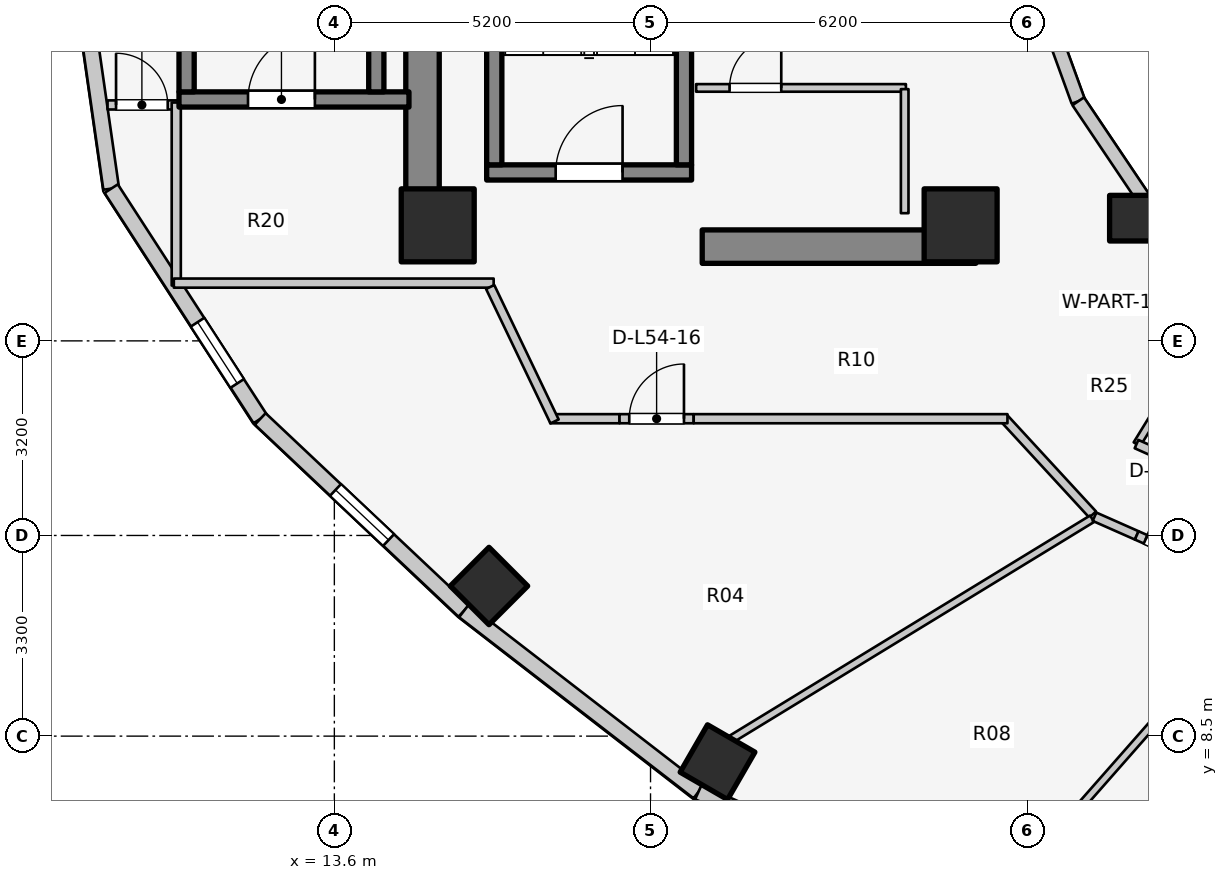
"""IFC4 building model, lengths in metres.
Left out: names, types, materials, properties, quantities, classifications, styles, units other than length and angle.
Written with IfcOpenShell. Run it as: python <this file> out.ifc"""

import sys

from ifc_helpers import new_model, si_unit, direction, frame, frame_2d, origin, origin_2d, place, context, subcontext, project, spatial, rectangle, extrude, element, fill, save


model = new_model("IFC4")
c1 = context("Model", 3, precision=1e-05, world=origin(), true_north=direction((0.0, 1.0)))
c2 = subcontext(c1, "Body", "Model", "MODEL_VIEW")
j1 = project(units=[si_unit("LENGTHUNIT", "METRE"), si_unit("PLANEANGLEUNIT", "RADIAN")], contexts=[c1])
p1 = place(None, origin())
s1 = spatial("IfcSite", under=j1, at=p1, CompositionType="ELEMENT")
p2 = place(p1, origin())
s2 = spatial("IfcBuilding", under=s1, at=p2, CompositionType="ELEMENT")
p3 = place(p2, frame((0.0, 0.0, 177.7)))
s3 = spatial("IfcBuildingStorey", under=s2, at=p3, CompositionType="ELEMENT", Elevation=177.7)
p4 = place(p3, frame((15.05, 17.05, 0.0), z_axis=(0.0, 0.0, 1.0), x_axis=(0.0, 1.0, 0.0)))
e1 = element("IfcWall", 1, at=p4, inside=s3, PredefinedType="SHEAR", context=c2, shape_type="SweptSolid", body=[
    extrude(rectangle(XDim=12.8, YDim=0.55, at=frame_2d((6.4, 0.0))), origin(), (0.0, 0.0, 1.0), 3.1),
])
p5 = place(p3, frame((19.65, 16.55, 0.0), z_axis=(0.0, 0.0, 1.0), x_axis=(1.0, 0.0, 0.0)))
e2 = element("IfcWall", 2, at=p5, inside=s3, PredefinedType="SHEAR", context=c2, shape_type="SweptSolid", body=[
    extrude(rectangle(XDim=4.5, YDim=0.55, at=frame_2d((2.25, 0.0))), origin(), (0.0, 0.0, 1.0), 3.1),
])
p6 = place(p3, frame((16.105, 17.77, 0.0), z_axis=(0.0, 0.0, 1.0), x_axis=(1.0, 0.0, 0.0)))
e3 = element("IfcWall", 3, at=p6, inside=s3, PredefinedType="SOLIDWALL", context=c2, shape_type="SweptSolid", body=[
    extrude(rectangle(XDim=3.37, YDim=0.25, at=frame_2d((1.685, 0.0))), origin(), (0.0, 0.0, 1.0), 3.1),
])
p7 = place(p6, frame((1.135, 0.0, 0.0)))
e4 = element("IfcOpeningElement", 4, at=p7, cuts=e3, PredefinedType="OPENING", context=c2, shape_type="SweptSolid", body=[
    extrude(rectangle(XDim=1.1, YDim=2.1, at=frame_2d((0.55, 1.05))), frame((0.0, 0.135, 0.0), z_axis=(0.0, -1.0, 0.0), x_axis=(1.0, 0.0, 0.0)), (0.0, 0.0, 1.0), 0.27),
])
for number, where, z_axis, x_axis in (
    (5, (16.23, 17.895, 0.0), (0.0, 0.0, 1.0), (0.0, 1.0, 0.0)),
    (6, (19.35, 17.895, 0.0), (0.0, 0.0, 1.0), (0.0, 1.0, 0.0)),
):
    element("IfcWall", number, at=place(p3, frame(where, z_axis=z_axis, x_axis=x_axis)), inside=s3, PredefinedType="SOLIDWALL", context=c2, shape_type="SweptSolid", body=[
        extrude(rectangle(XDim=7.81, YDim=0.25, at=frame_2d((3.905, 0.0))), origin(), (0.0, 0.0, 1.0), 3.1),
    ])
p8 = place(p3, frame((11.045, 18.97, 0.0), z_axis=(0.0, 0.0, 1.0), x_axis=(1.0, 0.0, 0.0)))
e7 = element("IfcWall", 7, at=p8, inside=s3, PredefinedType="SOLIDWALL", context=c2, shape_type="SweptSolid", body=[
    extrude(rectangle(XDim=3.782, YDim=0.25, at=frame_2d((1.891, 0.0))), origin(), (0.0, 0.0, 1.0), 3.1),
])
p9 = place(p8, frame((1.135, 0.0, 0.0)))
e8 = element("IfcOpeningElement", 8, at=p9, cuts=e7, PredefinedType="OPENING", context=c2, shape_type="SweptSolid", body=[
    extrude(rectangle(XDim=1.1, YDim=2.1, at=frame_2d((0.55, 1.05))), frame((0.0, 0.135, 0.0), z_axis=(0.0, -1.0, 0.0), x_axis=(1.0, 0.0, 0.0)), (0.0, 0.0, 1.0), 0.27),
])
for number, where, z_axis, x_axis in (
    (9, (11.17, 19.095, 0.0), (0.0, 0.0, 1.0), (0.0, 1.0, 0.0)),
    (10, (14.29, 19.095, 0.0), (0.0, 0.0, 1.0), (0.0, 1.0, 0.0)),
):
    element("IfcWall", number, at=place(p3, frame(where, z_axis=z_axis, x_axis=x_axis)), inside=s3, PredefinedType="SOLIDWALL", context=c2, shape_type="SweptSolid", body=[
        extrude(rectangle(XDim=7.81, YDim=0.25, at=frame_2d((3.905, 0.0))), origin(), (0.0, 0.0, 1.0), 3.1),
    ])
for number, where, z_axis, x_axis in (
    (11, (15.3, 16.9, 0.0), (0.0, 0.0, 1.0), (1.0, 0.0, 0.0)),
    (12, (23.9, 16.9, 0.0), (0.0, 0.0, 1.0), (1.0, 0.0, 0.0)),
):
    element("IfcColumn", number, at=place(p3, frame(where, z_axis=z_axis, x_axis=x_axis)), inside=s3, PredefinedType="COLUMN", context=c2, shape_type="SweptSolid", body=[
        extrude(rectangle(XDim=1.2, YDim=1.2, at=origin_2d()), origin(), (0.0, 0.0, 1.0), 3.1),
    ])
p10 = place(p3, frame((26.725, 17.018, 0.0), z_axis=(0.0, 0.0, 1.0), x_axis=(1.0, 0.0, 0.0)))
e13 = element("IfcColumn", 13, at=p10, inside=s3, PredefinedType="COLUMN", context=c2, shape_type="SweptSolid", body=[
    extrude(rectangle(XDim=0.75, YDim=0.75, at=origin_2d()), origin(), (0.0, 0.0, 1.0), 3.1),
])
for number, where, z_axis, x_axis in (
    (14, (16.143, 10.969, 0.0), (0.0, 0.0, 1.0), (-0.707, -0.707, 0.0)),
    (15, (19.902, 8.072, 0.0), (0.0, 0.0, 1.0), (-0.5, -0.866, 0.0)),
):
    element("IfcColumn", number, at=place(p3, frame(where, z_axis=z_axis, x_axis=x_axis)), inside=s3, PredefinedType="COLUMN", context=c2, shape_type="SweptSolid", body=[
        extrude(rectangle(XDim=0.9, YDim=0.9, at=origin_2d()), origin(), (0.0, 0.0, 1.0), 3.1),
    ])
p11 = place(p3, frame((25.123, 20.898, 0.0), z_axis=(0.0, 0.0, 1.0), x_axis=(0.341423187295, -0.93990968033, 0.0)))
e16 = element("IfcWall", 16, at=p11, inside=s3, PredefinedType="STANDARD", context=c2, shape_type="SweptSolid", body=[
    extrude(rectangle(XDim=2.084, YDim=0.23, at=frame_2d((1.042, 0.0))), origin(), (0.0, 0.0, 1.0), 2.56),
])
p12 = place(p3, frame((25.834, 18.94, 0.0), z_axis=(0.0, 0.0, 1.0), x_axis=(0.558197800898, -0.829707909492, 0.0)))
e17 = element("IfcWall", 17, at=p12, inside=s3, PredefinedType="STANDARD", context=c2, shape_type="SweptSolid", body=[
    extrude(rectangle(XDim=2.027, YDim=0.23, at=frame_2d((1.013, 0.0))), origin(), (0.0, 0.0, 1.0), 1.22),
])
p13 = place(p3, frame((26.965, 17.258, 0.0), z_axis=(0.0, 0.0, 1.0), x_axis=(0.752576694707, -0.658504607869, 0.0)))
e18 = element("IfcWall", 18, at=p13, inside=s3, PredefinedType="STANDARD", context=c2, shape_type="SweptSolid", body=[
    extrude(rectangle(XDim=1.959, YDim=0.23, at=frame_2d((0.98, 0.0))), origin(), (0.0, 0.0, 1.0), 1.22),
])
p14 = place(p3, frame((9.14, 23.0, 0.0), z_axis=(0.0, 0.0, 1.0), x_axis=(0.142227632286, -0.989833976288, 0.0)))
e19 = element("IfcWall", 19, at=p14, inside=s3, PredefinedType="STANDARD", context=c2, shape_type="SweptSolid", body=[
    extrude(rectangle(XDim=5.553, YDim=0.26, at=frame_2d((2.776, 0.0))), origin(), (0.0, 0.0, 1.0), 2.57),
])
p15 = place(p14, frame((1.506, 0.0, 0.75)))
e20 = element("IfcOpeningElement", 20, at=p15, cuts=e19, PredefinedType="OPENING", context=c2, shape_type="SweptSolid", body=[
    extrude(rectangle(XDim=1.2, YDim=1.5, at=frame_2d((0.6, 0.75))), frame((0.0, 0.14, 0.0), z_axis=(0.0, -1.0, 0.0), x_axis=(1.0, 0.0, 0.0)), (0.0, 0.0, 1.0), 0.28),
])
p16 = place(p3, frame((9.93, 17.503, 0.0), z_axis=(0.0, 0.0, 1.0), x_axis=(0.543358984534, -0.839500454989, 0.0)))
e21 = element("IfcWall", 21, at=p16, inside=s3, PredefinedType="STANDARD", context=c2, shape_type="SweptSolid", body=[
    extrude(rectangle(XDim=4.511, YDim=0.26, at=frame_2d((2.256, 0.0))), origin(), (0.0, 0.0, 1.0), 1.22),
])
p17 = place(p16, frame((2.615, 0.0, 0.15)))
e22 = element("IfcOpeningElement", 22, at=p17, cuts=e21, PredefinedType="OPENING", context=c2, shape_type="SweptSolid", body=[
    extrude(rectangle(XDim=1.2, YDim=0.9, at=frame_2d((0.6, 0.45))), frame((0.0, 0.14, 0.0), z_axis=(0.0, -1.0, 0.0), x_axis=(1.0, 0.0, 0.0)), (0.0, 0.0, 1.0), 0.28),
])
p18 = place(p3, frame((12.381, 13.716, 0.0), z_axis=(0.0, 0.0, 1.0), x_axis=(0.727667301037, -0.68593024354, 0.0)))
e23 = element("IfcWall", 23, at=p18, inside=s3, PredefinedType="STANDARD", context=c2, shape_type="SweptSolid", body=[
    extrude(rectangle(XDim=4.604, YDim=0.26, at=frame_2d((2.302, 0.0))), origin(), (0.0, 0.0, 1.0), 1.22),
])
p19 = place(p18, frame((1.702, 0.0, 0.15)))
e24 = element("IfcOpeningElement", 24, at=p19, cuts=e23, PredefinedType="OPENING", context=c2, shape_type="SweptSolid", body=[
    extrude(rectangle(XDim=1.2, YDim=0.9, at=frame_2d((0.6, 0.45))), frame((0.0, 0.14, 0.0), z_axis=(0.0, -1.0, 0.0), x_axis=(1.0, 0.0, 0.0)), (0.0, 0.0, 1.0), 0.28),
])
p20 = place(p3, frame((15.731, 10.559, 0.0), z_axis=(0.0, 0.0, 1.0), x_axis=(0.791460185804, -0.611220724687, 0.0)))
e25 = element("IfcWall", 25, at=p20, inside=s3, PredefinedType="STANDARD", context=c2, shape_type="SweptSolid", body=[
    extrude(rectangle(XDim=4.872, YDim=0.26, at=frame_2d((2.436, 0.0))), origin(), (0.0, 0.0, 1.0), 1.22),
])
p21 = place(p3, frame((19.587, 7.581, 0.0), z_axis=(0.0, 0.0, 1.0), x_axis=(0.912353637112, -0.409403029847, 0.0)))
e26 = element("IfcWall", 26, at=p21, inside=s3, PredefinedType="STANDARD", context=c2, shape_type="SweptSolid", body=[
    extrude(rectangle(XDim=5.533, YDim=0.26, at=frame_2d((2.766, 0.0))), origin(), (0.0, 0.0, 1.0), 1.22),
])
p22 = place(p21, frame((2.167, 0.0, 0.15)))
e27 = element("IfcOpeningElement", 27, at=p22, cuts=e26, PredefinedType="OPENING", context=c2, shape_type="SweptSolid", body=[
    extrude(rectangle(XDim=1.2, YDim=0.9, at=frame_2d((0.6, 0.45))), frame((0.0, 0.14, 0.0), z_axis=(0.0, -1.0, 0.0), x_axis=(1.0, 0.0, 0.0)), (0.0, 0.0, 1.0), 0.28),
])
p23 = place(p3, frame((19.55, 19.16, 0.0), z_axis=(0.0, 0.0, 1.0), x_axis=(1.0, 0.0, 0.0)))
e28 = element("IfcWall", 28, at=p23, inside=s3, PredefinedType="PARTITIONING", context=c2, shape_type="SweptSolid", body=[
    extrude(rectangle(XDim=3.45, YDim=0.125, at=frame_2d((1.725, 0.0))), origin(), (0.0, 0.0, 1.0), 2.12),
])
p24 = place(p23, frame((0.55, 0.0, 0.0)))
e29 = element("IfcOpeningElement", 29, at=p24, cuts=e28, PredefinedType="OPENING", context=c2, shape_type="SweptSolid", body=[
    extrude(rectangle(XDim=0.85, YDim=2.05, at=frame_2d((0.425, 1.025))), frame((0.0, 0.073, 0.0), z_axis=(0.0, -1.0, 0.0), x_axis=(1.0, 0.0, 0.0)), (0.0, 0.0, 1.0), 0.145),
])
p25 = place(p3, frame((22.98, 17.1, 0.0), z_axis=(0.0, 0.0, 1.0), x_axis=(0.0, 1.0, 0.0)))
e30 = element("IfcWall", 30, at=p25, inside=s3, PredefinedType="PARTITIONING", context=c2, shape_type="SweptSolid", body=[
    extrude(rectangle(XDim=2.04, YDim=0.125, at=frame_2d((1.02, 0.0))), origin(), (0.0, 0.0, 1.0), 2.575),
])
p26 = place(p3, frame((9.87, 18.88, 0.0), z_axis=(0.0, 0.0, 1.0), x_axis=(1.0, 0.0, 0.0)))
e31 = element("IfcWall", 31, at=p26, inside=s3, PredefinedType="PARTITIONING", context=c2, shape_type="SweptSolid", body=[
    extrude(rectangle(XDim=1.17, YDim=0.15, at=frame_2d((0.585, 0.0))), origin(), (0.0, 0.0, 1.0), 2.575),
])
p27 = place(p26, frame((0.14, 0.0, 0.0)))
e32 = element("IfcOpeningElement", 32, at=p27, cuts=e31, PredefinedType="OPENING", context=c2, shape_type="SweptSolid", body=[
    extrude(rectangle(XDim=0.85, YDim=2.05, at=frame_2d((0.425, 1.025))), frame((0.0, 0.085, 0.0), z_axis=(0.0, -1.0, 0.0), x_axis=(1.0, 0.0, 0.0)), (0.0, 0.0, 1.0), 0.17),
])
p28 = place(p3, frame((11.0, 15.91, 0.0), z_axis=(0.0, 0.0, 1.0), x_axis=(0.0, 1.0, 0.0)))
e33 = element("IfcWall", 33, at=p28, inside=s3, PredefinedType="PARTITIONING", context=c2, shape_type="SweptSolid", body=[
    extrude(rectangle(XDim=3.01, YDim=0.15, at=frame_2d((1.505, 0.0))), origin(), (0.0, 0.0, 1.0), 2.575),
])
p29 = place(p3, frame((10.96, 15.95, 0.0), z_axis=(0.0, 0.0, 1.0), x_axis=(1.0, 0.0, 0.0)))
e34 = element("IfcWall", 34, at=p29, inside=s3, PredefinedType="PARTITIONING", context=c2, shape_type="SweptSolid", body=[
    extrude(rectangle(XDim=5.26, YDim=0.15, at=frame_2d((2.63, 0.0))), origin(), (0.0, 0.0, 1.0), 1.22),
])
p30 = place(p3, frame((26.072, 12.144, 0.0), z_axis=(0.0, 0.0, 1.0), x_axis=(-0.677579737957, 0.735449317567, 0.0)))
e35 = element("IfcWall", 35, at=p30, inside=s3, PredefinedType="PARTITIONING", context=c2, shape_type="SweptSolid", body=[
    extrude(rectangle(XDim=2.173, YDim=0.15, at=frame_2d((1.086, 0.0))), origin(), (0.0, 0.0, 1.0), 2.019),
])
p31 = place(p3, frame((17.15, 13.72, 0.0), z_axis=(0.0, 0.0, 1.0), x_axis=(1.0, 0.0, 0.0)))
e36 = element("IfcWall", 36, at=p31, inside=s3, PredefinedType="PARTITIONING", context=c2, shape_type="SweptSolid", body=[
    extrude(rectangle(XDim=1.14, YDim=0.15, at=frame_2d((0.57, 0.0))), origin(), (0.0, 0.0, 1.0), 2.575),
])
p32 = place(p3, frame((18.29, 13.72, 0.0), z_axis=(0.0, 0.0, 1.0), x_axis=(1.0, 0.0, 0.0)))
e37 = element("IfcWall", 37, at=p32, inside=s3, PredefinedType="PARTITIONING", context=c2, shape_type="SweptSolid", body=[
    extrude(rectangle(XDim=1.22, YDim=0.15, at=frame_2d((0.61, 0.0))), origin(), (0.0, 0.0, 1.0), 2.575),
])
p33 = place(p32, frame((0.16, 0.0, 0.0)))
e38 = element("IfcOpeningElement", 38, at=p33, cuts=e37, PredefinedType="OPENING", context=c2, shape_type="SweptSolid", body=[
    extrude(rectangle(XDim=0.9, YDim=2.1, at=frame_2d((0.45, 1.05))), frame((0.0, 0.085, 0.0), z_axis=(0.0, -1.0, 0.0), x_axis=(1.0, 0.0, 0.0)), (0.0, 0.0, 1.0), 0.17),
])
p34 = place(p3, frame((19.51, 13.72, 0.0), z_axis=(0.0, 0.0, 1.0), x_axis=(1.0, 0.0, 0.0)))
e39 = element("IfcWall", 39, at=p34, inside=s3, PredefinedType="PARTITIONING", context=c2, shape_type="SweptSolid", body=[
    extrude(rectangle(XDim=5.16, YDim=0.15, at=frame_2d((2.58, 0.0))), origin(), (0.0, 0.0, 1.0), 2.019),
])
p35 = place(p3, frame((17.222, 13.675, 0.0), z_axis=(0.0, 0.0, 1.0), x_axis=(-0.431973389813, 0.901886351207, 0.0)))
e40 = element("IfcWall", 40, at=p35, inside=s3, PredefinedType="PARTITIONING", context=c2, shape_type="SweptSolid", body=[
    extrude(rectangle(XDim=2.452, YDim=0.15, at=frame_2d((1.226, 0.0))), origin(), (0.0, 0.0, 1.0), 2.575),
])
p36 = place(p3, frame((28.45, 15.985, 0.0), z_axis=(0.0, 0.0, 1.0), x_axis=(-0.523587550846, -0.851971875474, 0.0)))
e41 = element("IfcWall", 41, at=p36, inside=s3, PredefinedType="PARTITIONING", context=c2, shape_type="SweptSolid", body=[
    extrude(rectangle(XDim=3.153, YDim=0.125, at=frame_2d((1.577, 0.0))), origin(), (0.0, 0.0, 1.0), 2.019),
])
p37 = place(p3, frame((26.793, 13.303, 0.0), z_axis=(0.0, 0.0, 1.0), x_axis=(0.913145536541, -0.407633694749, 0.0)))
e42 = element("IfcWall", 42, at=p37, inside=s3, PredefinedType="PARTITIONING", context=c2, shape_type="SweptSolid", body=[
    extrude(rectangle(XDim=2.756, YDim=0.15, at=frame_2d((1.378, 0.0))), origin(), (0.0, 0.0, 1.0), 2.019),
])
p38 = place(p3, frame((26.062, 12.075, 0.0), z_axis=(0.0, 0.0, 1.0), x_axis=(-0.853440334679, -0.521190555501, 0.0)))
e43 = element("IfcWall", 43, at=p38, inside=s3, PredefinedType="PARTITIONING", context=c2, shape_type="SweptSolid", body=[
    extrude(rectangle(XDim=6.966, YDim=0.125, at=frame_2d((3.483, 0.0))), origin(), (0.0, 0.0, 1.0), 1.22),
])
p39 = place(p3, frame((28.914, 10.805, 0.0), z_axis=(0.0, 0.0, 1.0), x_axis=(-0.660581320981, -0.750754499401, 0.0)))
e44 = element("IfcWall", 44, at=p39, inside=s3, PredefinedType="PARTITIONING", context=c2, shape_type="SweptSolid", body=[
    extrude(rectangle(XDim=6.027, YDim=0.125, at=frame_2d((3.013, 0.0))), origin(), (0.0, 0.0, 1.0), 1.22),
])
p40 = place(p3, frame((26.102, 12.108, 0.0), z_axis=(0.0, 0.0, 1.0), x_axis=(0.914526186943, -0.404526702945, 0.0)))
e45 = element("IfcWall", 45, at=p40, inside=s3, PredefinedType="PARTITIONING", context=c2, shape_type="SweptSolid", body=[
    extrude(rectangle(XDim=0.759, YDim=0.15, at=frame_2d((0.38, 0.0))), origin(), (0.0, 0.0, 1.0), 2.575),
])
p41 = place(p3, frame((26.796, 11.801, 0.0), z_axis=(0.0, 0.0, 1.0), x_axis=(0.914549810084, -0.404473293155, 0.0)))
e46 = element("IfcWall", 46, at=p41, inside=s3, PredefinedType="PARTITIONING", context=c2, shape_type="SweptSolid", body=[
    extrude(rectangle(XDim=1.32, YDim=0.15, at=frame_2d((0.66, 0.0))), origin(), (0.0, 0.0, 1.0), 2.16),
])
p42 = place(p41, frame((0.16, 0.0, 0.0)))
e47 = element("IfcOpeningElement", 47, at=p42, cuts=e46, PredefinedType="OPENING", context=c2, shape_type="SweptSolid", body=[
    extrude(rectangle(XDim=1.0, YDim=2.1, at=frame_2d((0.5, 1.05))), frame((0.0, 0.085, 0.0), z_axis=(0.0, -1.0, 0.0), x_axis=(1.0, 0.0, 0.0)), (0.0, 0.0, 1.0), 0.17),
])
p43 = place(p17, origin())
e48 = element("IfcWindow", 48, at=p43, inside=s3, PartitioningType="SINGLE_PANEL", PredefinedType="WINDOW", context=c2, shape_type="SweptSolid", body=[
    extrude(rectangle(XDim=1.2, YDim=0.9, at=frame_2d((0.6, 0.45))), frame((0.0, 0.03, 0.0), z_axis=(0.0, -1.0, 0.0), x_axis=(1.0, 0.0, 0.0)), (0.0, 0.0, 1.0), 0.06),
])
fill(e22, e48)
p44 = place(p19, origin())
e49 = element("IfcWindow", 49, at=p44, inside=s3, PartitioningType="SINGLE_PANEL", PredefinedType="WINDOW", context=c2, shape_type="SweptSolid", body=[
    extrude(rectangle(XDim=1.2, YDim=0.9, at=frame_2d((0.6, 0.45))), frame((0.0, 0.03, 0.0), z_axis=(0.0, -1.0, 0.0), x_axis=(1.0, 0.0, 0.0)), (0.0, 0.0, 1.0), 0.06),
])
fill(e24, e49)
p45 = place(p7, origin())
e50 = element("IfcDoor", 50, at=p45, inside=s3, OperationType="SINGLE_SWING_RIGHT", PredefinedType="DOOR", context=c2, shape_type="SweptSolid", body=[
    extrude(rectangle(XDim=1.1, YDim=2.1, at=frame_2d((0.55, 1.05))), frame((0.0, 0.025, 0.0), z_axis=(0.0, -1.0, 0.0), x_axis=(1.0, 0.0, 0.0)), (0.0, 0.0, 1.0), 0.05),
])
fill(e4, e50)
p46 = place(p9, origin())
e51 = element("IfcDoor", 51, at=p46, inside=s3, OperationType="SINGLE_SWING_RIGHT", PredefinedType="DOOR", context=c2, shape_type="SweptSolid", body=[
    extrude(rectangle(XDim=1.1, YDim=2.1, at=frame_2d((0.55, 1.05))), frame((0.0, 0.025, 0.0), z_axis=(0.0, -1.0, 0.0), x_axis=(1.0, 0.0, 0.0)), (0.0, 0.0, 1.0), 0.05),
])
fill(e8, e51)
p47 = place(p24, origin())
e52 = element("IfcDoor", 52, at=p47, inside=s3, OperationType="SINGLE_SWING_RIGHT", PredefinedType="DOOR", context=c2, shape_type="SweptSolid", body=[
    extrude(rectangle(XDim=0.85, YDim=2.05, at=frame_2d((0.425, 1.025))), frame((0.0, 0.025, 0.0), z_axis=(0.0, -1.0, 0.0), x_axis=(1.0, 0.0, 0.0)), (0.0, 0.0, 1.0), 0.05),
])
fill(e29, e52)
p48 = place(p27, origin())
e53 = element("IfcDoor", 53, at=p48, inside=s3, OperationType="SINGLE_SWING_LEFT", PredefinedType="DOOR", context=c2, shape_type="SweptSolid", body=[
    extrude(rectangle(XDim=0.85, YDim=2.05, at=frame_2d((0.425, 1.025))), frame((0.0, 0.025, 0.0), z_axis=(0.0, -1.0, 0.0), x_axis=(1.0, 0.0, 0.0)), (0.0, 0.0, 1.0), 0.05),
])
fill(e32, e53)
p49 = place(p33, origin())
e54 = element("IfcDoor", 54, at=p49, inside=s3, OperationType="SINGLE_SWING_RIGHT", PredefinedType="DOOR", context=c2, shape_type="SweptSolid", body=[
    extrude(rectangle(XDim=0.9, YDim=2.1, at=frame_2d((0.45, 1.05))), frame((0.0, 0.025, 0.0), z_axis=(0.0, -1.0, 0.0), x_axis=(1.0, 0.0, 0.0)), (0.0, 0.0, 1.0), 0.05),
])
fill(e38, e54)
p50 = place(p42, origin())
e55 = element("IfcDoor", 55, at=p50, inside=s3, OperationType="SINGLE_SWING_LEFT", PredefinedType="DOOR", context=c2, shape_type="SweptSolid", body=[
    extrude(rectangle(XDim=1.0, YDim=2.1, at=frame_2d((0.5, 1.05))), frame((0.0, 0.025, 0.0), z_axis=(0.0, -1.0, 0.0), x_axis=(1.0, 0.0, 0.0)), (0.0, 0.0, 1.0), 0.05),
])
fill(e47, e55)
save(model, sys.argv[1])
